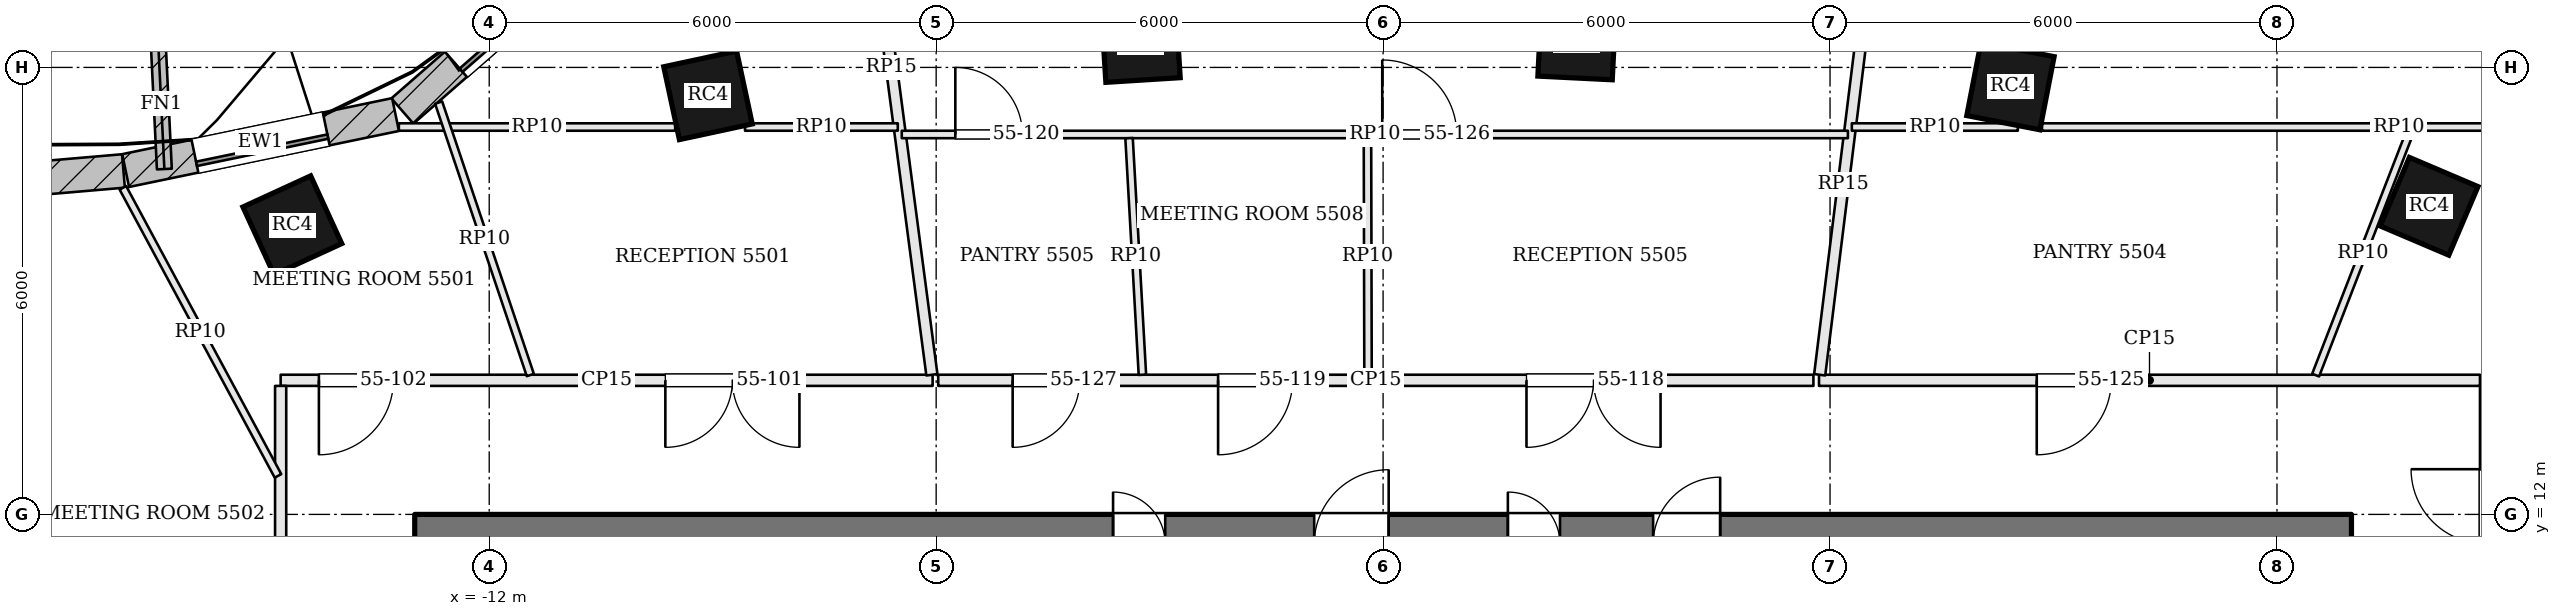
"""IFC4 building model, lengths in metres.
Left out: names, types, materials, properties, quantities, classifications, styles, units other than length and angle.
Written with IfcOpenShell. Run it as: python <this file> out.ifc"""

import sys

from ifc_helpers import new_model, si_unit, direction, frame, frame_2d, origin, origin_2d, place, context, subcontext, project, spatial, rectangle, extrude, element, fill, save


model = new_model("IFC4")
c1 = context("Model", 3, precision=1e-05, world=origin(), true_north=direction((0.0, 1.0)))
c2 = subcontext(c1, "Body", "Model", "MODEL_VIEW")
j1 = project(units=[si_unit("LENGTHUNIT", "METRE"), si_unit("PLANEANGLEUNIT", "RADIAN")], contexts=[c1])
p1 = place(None, origin())
s1 = spatial("IfcSite", under=j1, at=p1, CompositionType="ELEMENT")
p2 = place(p1, origin())
s2 = spatial("IfcBuilding", under=s1, at=p2, CompositionType="ELEMENT")
p3 = place(p2, frame((0.0, 0.0, 225.3)))
s3 = spatial("IfcBuildingStorey", under=s2, at=p3, CompositionType="ELEMENT", Elevation=225.3)
p4 = place(p3, frame((-13.0, 11.6, 0.0), z_axis=(0.0, 0.0, 1.0), x_axis=(1.0, 0.0, 0.0)))
e1 = element("IfcWall", 1, at=p4, inside=s3, PredefinedType="SHEAR", context=c2, shape_type="SweptSolid", body=[
    extrude(rectangle(XDim=26.0, YDim=0.8, at=frame_2d((13.0, 0.0))), origin(), (0.0, 0.0, 1.0), 3.9),
])
p5 = place(p4, frame((9.375, 0.0, 0.0)))
e2 = element("IfcOpeningElement", 2, at=p5, cuts=e1, PredefinedType="OPENING", context=c2, shape_type="SweptSolid", body=[
    extrude(rectangle(XDim=0.7, YDim=2.1, at=frame_2d((0.35, 1.05))), frame((0.0, 0.41, 0.0), z_axis=(0.0, -1.0, 0.0), x_axis=(1.0, 0.0, 0.0)), (0.0, 0.0, 1.0), 0.82),
])
p6 = place(p4, frame((12.075, 0.0, 0.0)))
e3 = element("IfcOpeningElement", 3, at=p6, cuts=e1, PredefinedType="OPENING", context=c2, shape_type="SweptSolid", body=[
    extrude(rectangle(XDim=1.0, YDim=2.1, at=frame_2d((0.5, 1.05))), frame((0.0, 0.41, 0.0), z_axis=(0.0, -1.0, 0.0), x_axis=(1.0, 0.0, 0.0)), (0.0, 0.0, 1.0), 0.82),
])
p7 = place(p4, frame((14.675, 0.0, 0.0)))
e4 = element("IfcOpeningElement", 4, at=p7, cuts=e1, PredefinedType="OPENING", context=c2, shape_type="SweptSolid", body=[
    extrude(rectangle(XDim=0.7, YDim=2.1, at=frame_2d((0.35, 1.05))), frame((0.0, 0.41, 0.0), z_axis=(0.0, -1.0, 0.0), x_axis=(1.0, 0.0, 0.0)), (0.0, 0.0, 1.0), 0.82),
])
p8 = place(p4, frame((16.625, 0.0, 0.0)))
e5 = element("IfcOpeningElement", 5, at=p8, cuts=e1, PredefinedType="OPENING", context=c2, shape_type="SweptSolid", body=[
    extrude(rectangle(XDim=0.9, YDim=2.1, at=frame_2d((0.45, 1.05))), frame((0.0, 0.41, 0.0), z_axis=(0.0, -1.0, 0.0), x_axis=(1.0, 0.0, 0.0)), (0.0, 0.0, 1.0), 0.82),
])
for number, where, z_axis, x_axis in (
    (6, (14.042, 16.136, 0.0), (0.0, 0.0, 1.0), (-0.92, 0.392, 0.0)),
    (7, (8.422, 17.749, 0.0), (0.0, 0.0, 1.0), (-0.982, 0.191, 0.0)),
    (8, (2.602, 18.358, 0.0), (0.0, 0.0, 1.0), (-0.999, 0.05, 0.0)),
    (9, (-3.254, 18.33, 0.0), (0.0, 0.0, 1.0), (-0.998, -0.063, 0.0)),
    (10, (-9.063, 17.625, 0.0), (0.0, 0.0, 1.0), (-0.978, -0.21, 0.0)),
    (11, (-14.643, 15.881, 0.0), (0.0, 0.0, 1.0), (-0.909, -0.417, 0.0)),
):
    element("IfcColumn", number, at=place(p3, frame(where, z_axis=z_axis, x_axis=x_axis)), inside=s3, PredefinedType="COLUMN", context=c2, shape_type="SweptSolid", body=[
        extrude(rectangle(XDim=1.0, YDim=1.0, at=origin_2d()), origin(), (0.0, 0.0, 1.0), 3.9),
    ])
p9 = place(p3, frame((-10.146, 20.051, 0.0), z_axis=(0.0, 0.0, 1.0), x_axis=(-0.753278140428, -0.657702093013, 0.0)))
e12 = element("IfcWall", 12, at=p9, inside=s3, PredefinedType="SOLIDWALL", context=c2, shape_type="SweptSolid", body=[
    extrude(rectangle(XDim=4.008, YDim=0.45, at=frame_2d((2.004, 0.0))), origin(), (0.0, 0.0, 1.0), 3.7),
])
p10 = place(p9, frame((0.954, 0.0, 0.9)))
e13 = element("IfcOpeningElement", 13, at=p10, cuts=e12, PredefinedType="OPENING", context=c2, shape_type="SweptSolid", body=[
    extrude(rectangle(XDim=2.1, YDim=2.3, at=frame_2d((1.05, 1.15))), frame((0.0, 0.235, 0.0), z_axis=(0.0, -1.0, 0.0), x_axis=(1.0, 0.0, 0.0)), (0.0, 0.0, 1.0), 0.47),
])
p11 = place(p3, frame((-13.258, 17.367, 0.0), z_axis=(0.0, 0.0, 1.0), x_axis=(-0.97914968674, -0.203140077183, 0.0)))
e14 = element("IfcWall", 14, at=p11, inside=s3, PredefinedType="SOLIDWALL", context=c2, shape_type="SweptSolid", body=[
    extrude(rectangle(XDim=3.7, YDim=0.45, at=frame_2d((1.85, 0.0))), origin(), (0.0, 0.0, 1.0), 3.7),
])
p12 = place(p11, frame((0.95, 0.0, 0.9)))
e15 = element("IfcOpeningElement", 15, at=p12, cuts=e14, PredefinedType="OPENING", context=c2, shape_type="SweptSolid", body=[
    extrude(rectangle(XDim=1.8, YDim=2.3, at=frame_2d((0.9, 1.15))), frame((0.0, 0.235, 0.0), z_axis=(0.0, -1.0, 0.0), x_axis=(1.0, 0.0, 0.0)), (0.0, 0.0, 1.0), 0.47),
])
p13 = place(p3, frame((-16.91, 16.61, 0.0), z_axis=(0.0, 0.0, 1.0), x_axis=(-0.996333165816, -0.085558299972, 0.0)))
e16 = element("IfcWall", 16, at=p13, inside=s3, PredefinedType="SOLIDWALL", context=c2, shape_type="SweptSolid", body=[
    extrude(rectangle(XDim=5.596, YDim=0.45, at=frame_2d((2.798, 0.0))), origin(), (0.0, 0.0, 1.0), 3.7),
])
p14 = place(p13, frame((1.748, 0.0, 0.9)))
e17 = element("IfcOpeningElement", 17, at=p14, cuts=e16, PredefinedType="OPENING", context=c2, shape_type="SweptSolid", body=[
    extrude(rectangle(XDim=2.1, YDim=2.3, at=frame_2d((1.05, 1.15))), frame((0.0, 0.235, 0.0), z_axis=(0.0, -1.0, 0.0), x_axis=(1.0, 0.0, 0.0)), (0.0, 0.0, 1.0), 0.47),
])
p15 = place(p3, frame((-16.361, 16.636, 0.0), z_axis=(0.0, 0.0, 1.0), x_axis=(-0.048552811097, 0.998820616795, 0.0)))
e18 = element("IfcWall", 18, at=p15, inside=s3, PredefinedType="SOLIDWALL", context=c2, shape_type="SweptSolid", body=[
    extrude(rectangle(XDim=1.75, YDim=0.2, at=frame_2d((0.875, 0.0))), origin(), (0.0, 0.0, 1.0), 3.7),
])
p16 = place(p3, frame((-6.048, 13.8, 0.0), z_axis=(0.0, 0.0, 1.0), x_axis=(-1.0, 0.0, 0.0)))
e19 = element("IfcWall", 19, at=p16, inside=s3, PredefinedType="PARTITIONING", context=c2, shape_type="SweptSolid", body=[
    extrude(rectangle(XDim=8.752, YDim=0.15, at=frame_2d((4.376, 0.0))), origin(), (0.0, 0.0, 1.0), 3.084),
])
p17 = place(p16, frame((1.788, 0.0, 0.0)))
e20 = element("IfcOpeningElement", 20, at=p17, cuts=e19, PredefinedType="OPENING", context=c2, shape_type="SweptSolid", body=[
    extrude(rectangle(XDim=1.8, YDim=2.1, at=frame_2d((0.9, 1.05))), frame((0.0, 0.085, 0.0), z_axis=(0.0, -1.0, 0.0), x_axis=(1.0, 0.0, 0.0)), (0.0, 0.0, 1.0), 0.17),
])
p18 = place(p16, frame((7.239, 0.0, 0.0)))
e21 = element("IfcOpeningElement", 21, at=p18, cuts=e19, PredefinedType="OPENING", context=c2, shape_type="SweptSolid", body=[
    extrude(rectangle(XDim=1.0, YDim=2.4, at=frame_2d((0.5, 1.2))), frame((0.0, 0.085, 0.0), z_axis=(0.0, -1.0, 0.0), x_axis=(1.0, 0.0, 0.0)), (0.0, 0.0, 1.0), 0.17),
])
p19 = place(p3, frame((-14.8, 13.725, 0.0), z_axis=(0.0, 0.0, 1.0), x_axis=(0.0, -1.0, 0.0)))
e22 = element("IfcWall", 22, at=p19, inside=s3, PredefinedType="PARTITIONING", context=c2, shape_type="SweptSolid", body=[
    extrude(rectangle(XDim=15.965, YDim=0.15, at=frame_2d((7.982, 0.0))), origin(), (0.0, 0.0, 1.0), 3.084),
])
p20 = place(p19, frame((3.271, 0.0, 0.0)))
e23 = element("IfcOpeningElement", 23, at=p20, cuts=e22, PredefinedType="OPENING", context=c2, shape_type="SweptSolid", body=[
    extrude(rectangle(XDim=1.0, YDim=2.4, at=frame_2d((0.5, 1.2))), frame((0.0, 0.085, 0.0), z_axis=(0.0, -1.0, 0.0), x_axis=(1.0, 0.0, 0.0)), (0.0, 0.0, 1.0), 0.17),
])
p21 = place(p19, frame((8.35, 0.0, 0.0)))
e24 = element("IfcOpeningElement", 24, at=p21, cuts=e22, PredefinedType="OPENING", context=c2, shape_type="SweptSolid", body=[
    extrude(rectangle(XDim=1.0, YDim=2.1, at=frame_2d((0.5, 1.05))), frame((0.0, 0.085, 0.0), z_axis=(0.0, -1.0, 0.0), x_axis=(1.0, 0.0, 0.0)), (0.0, 0.0, 1.0), 0.17),
])
p22 = place(p19, frame((13.15, 0.0, 0.0)))
e25 = element("IfcOpeningElement", 25, at=p22, cuts=e22, PredefinedType="OPENING", context=c2, shape_type="SweptSolid", body=[
    extrude(rectangle(XDim=1.0, YDim=2.1, at=frame_2d((0.5, 1.05))), frame((0.0, 0.085, 0.0), z_axis=(0.0, -1.0, 0.0), x_axis=(1.0, 0.0, 0.0)), (0.0, 0.0, 1.0), 0.17),
])
p23 = place(p3, frame((-7.144, 22.13, 0.0), z_axis=(0.0, 0.0, 1.0), x_axis=(0.130452237095, -0.991454594945, 0.0)))
e26 = element("IfcWall", 26, at=p23, inside=s3, PredefinedType="PARTITIONING", context=c2, shape_type="SweptSolid", body=[
    extrude(rectangle(XDim=8.326, YDim=0.15, at=frame_2d((4.163, 0.0))), origin(), (0.0, 0.0, 1.0), 3.184),
])
p24 = place(p3, frame((14.8, -2.171, 0.0), z_axis=(0.0, 0.0, 1.0), x_axis=(0.0, 1.0, 0.0)))
e27 = element("IfcWall", 27, at=p24, inside=s3, PredefinedType="PARTITIONING", context=c2, shape_type="SweptSolid", body=[
    extrude(rectangle(XDim=15.971, YDim=0.15, at=frame_2d((7.986, 0.0))), origin(), (0.0, 0.0, 1.0), 3.084),
])
p25 = place(p24, frame((4.2, 0.0, 0.0)))
e28 = element("IfcOpeningElement", 28, at=p25, cuts=e27, PredefinedType="OPENING", context=c2, shape_type="SweptSolid", body=[
    extrude(rectangle(XDim=1.8, YDim=2.1, at=frame_2d((0.9, 1.05))), frame((0.0, 0.085, 0.0), z_axis=(0.0, -1.0, 0.0), x_axis=(1.0, 0.0, 0.0)), (0.0, 0.0, 1.0), 0.17),
])
p26 = place(p24, frame((13.778, 0.0, 0.0)))
e29 = element("IfcOpeningElement", 29, at=p26, cuts=e27, PredefinedType="OPENING", context=c2, shape_type="SweptSolid", body=[
    extrude(rectangle(XDim=1.0, YDim=2.4, at=frame_2d((0.5, 1.2))), frame((0.0, 0.085, 0.0), z_axis=(0.0, -1.0, 0.0), x_axis=(1.0, 0.0, 0.0)), (0.0, 0.0, 1.0), 0.17),
])
p27 = place(p3, frame((14.725, 13.8, 0.0), z_axis=(0.0, 0.0, 1.0), x_axis=(-1.0, 0.0, 0.0)))
e30 = element("IfcWall", 30, at=p27, inside=s3, PredefinedType="PARTITIONING", context=c2, shape_type="SweptSolid", body=[
    extrude(rectangle(XDim=8.873, YDim=0.15, at=frame_2d((4.437, 0.0))), origin(), (0.0, 0.0, 1.0), 3.084),
])
p28 = place(p27, frame((4.95, 0.0, 0.0)))
e31 = element("IfcOpeningElement", 31, at=p28, cuts=e30, PredefinedType="OPENING", context=c2, shape_type="SweptSolid", body=[
    extrude(rectangle(XDim=1.0, YDim=2.1, at=frame_2d((0.5, 1.05))), frame((0.0, 0.085, 0.0), z_axis=(0.0, -1.0, 0.0), x_axis=(1.0, 0.0, 0.0)), (0.0, 0.0, 1.0), 0.17),
])
p29 = place(p3, frame((6.493, 18.982, 0.0), z_axis=(0.0, 0.0, 1.0), x_axis=(-0.122808633413, -0.992430370131, 0.0)))
e32 = element("IfcWall", 32, at=p29, inside=s3, PredefinedType="PARTITIONING", context=c2, shape_type="SweptSolid", body=[
    extrude(rectangle(XDim=5.147, YDim=0.15, at=frame_2d((2.573, 0.0))), origin(), (0.0, 0.0, 1.0), 3.184),
])
p30 = place(p3, frame((5.777, 13.8, 0.0), z_axis=(0.0, 0.0, 1.0), x_axis=(-1.0, 0.0, 0.0)))
e33 = element("IfcWall", 33, at=p30, inside=s3, PredefinedType="PARTITIONING", context=c2, shape_type="SweptSolid", body=[
    extrude(rectangle(XDim=11.749, YDim=0.15, at=frame_2d((5.875, 0.0))), origin(), (0.0, 0.0, 1.0), 3.084),
])
p31 = place(p30, frame((2.052, 0.0, 0.0)))
e34 = element("IfcOpeningElement", 34, at=p31, cuts=e33, PredefinedType="OPENING", context=c2, shape_type="SweptSolid", body=[
    extrude(rectangle(XDim=1.8, YDim=2.1, at=frame_2d((0.9, 1.05))), frame((0.0, 0.085, 0.0), z_axis=(0.0, -1.0, 0.0), x_axis=(1.0, 0.0, 0.0)), (0.0, 0.0, 1.0), 0.17),
])
p32 = place(p30, frame((6.992, 0.0, 0.0)))
e35 = element("IfcOpeningElement", 35, at=p32, cuts=e33, PredefinedType="OPENING", context=c2, shape_type="SweptSolid", body=[
    extrude(rectangle(XDim=1.0, YDim=2.4, at=frame_2d((0.5, 1.2))), frame((0.0, 0.085, 0.0), z_axis=(0.0, -1.0, 0.0), x_axis=(1.0, 0.0, 0.0)), (0.0, 0.0, 1.0), 0.17),
])
p33 = place(p30, frame((9.85, 0.0, 0.0)))
e36 = element("IfcOpeningElement", 36, at=p33, cuts=e33, PredefinedType="OPENING", context=c2, shape_type="SweptSolid", body=[
    extrude(rectangle(XDim=0.9, YDim=2.1, at=frame_2d((0.45, 1.05))), frame((0.0, 0.085, 0.0), z_axis=(0.0, -1.0, 0.0), x_axis=(1.0, 0.0, 0.0)), (0.0, 0.0, 1.0), 0.17),
])
p34 = place(p3, frame((-13.213, 17.2, 0.0), z_axis=(0.0, 0.0, 1.0), x_axis=(1.0, 0.0, 0.0)))
e37 = element("IfcWall", 37, at=p34, inside=s3, PredefinedType="PARTITIONING", context=c2, shape_type="SweptSolid", body=[
    extrude(rectangle(XDim=3.71, YDim=0.1, at=frame_2d((1.855, 0.0))), origin(), (0.0, 0.0, 1.0), 3.084),
])
p35 = place(p3, frame((-8.566, 17.2, 0.0), z_axis=(0.0, 0.0, 1.0), x_axis=(1.0, 0.0, 0.0)))
e38 = element("IfcWall", 38, at=p35, inside=s3, PredefinedType="PARTITIONING", context=c2, shape_type="SweptSolid", body=[
    extrude(rectangle(XDim=2.051, YDim=0.1, at=frame_2d((1.025, 0.0))), origin(), (0.0, 0.0, 1.0), 3.084),
])
p36 = place(p3, frame((-11.448, 13.871, 0.0), z_axis=(0.0, 0.0, 1.0), x_axis=(-0.319016686957, 0.94774909836, 0.0)))
e39 = element("IfcWall", 39, at=p36, inside=s3, PredefinedType="PARTITIONING", context=c2, shape_type="SweptSolid", body=[
    extrude(rectangle(XDim=3.859, YDim=0.1, at=frame_2d((1.929, 0.0))), origin(), (0.0, 0.0, 1.0), 3.084),
])
p37 = place(p3, frame((-14.836, 12.517, 0.0), z_axis=(0.0, 0.0, 1.0), x_axis=(-0.474069987859, 0.880487164365, 0.0)))
e40 = element("IfcWall", 40, at=p37, inside=s3, PredefinedType="PARTITIONING", context=c2, shape_type="SweptSolid", body=[
    extrude(rectangle(XDim=4.392, YDim=0.1, at=frame_2d((2.196, 0.0))), origin(), (0.0, 0.0, 1.0), 3.084),
])
p38 = place(p3, frame((6.293, 17.2, 0.0), z_axis=(0.0, 0.0, 1.0), x_axis=(1.0, 0.0, 0.0)))
e41 = element("IfcWall", 41, at=p38, inside=s3, PredefinedType="PARTITIONING", context=c2, shape_type="SweptSolid", body=[
    extrude(rectangle(XDim=2.229, YDim=0.1, at=frame_2d((1.114, 0.0))), origin(), (0.0, 0.0, 1.0), 3.084),
])
p39 = place(p3, frame((8.845, 17.2, 0.0), z_axis=(0.0, 0.0, 1.0), x_axis=(1.0, 0.0, 0.0)))
e42 = element("IfcWall", 42, at=p39, inside=s3, PredefinedType="PARTITIONING", context=c2, shape_type="SweptSolid", body=[
    extrude(rectangle(XDim=9.583, YDim=0.1, at=frame_2d((4.791, 0.0))), origin(), (0.0, 0.0, 1.0), 3.084),
])
p40 = place(p3, frame((12.519, 13.87, 0.0), z_axis=(0.0, 0.0, 1.0), x_axis=(0.361713546528, 0.932289284642, 0.0)))
e43 = element("IfcWall", 43, at=p40, inside=s3, PredefinedType="PARTITIONING", context=c2, shape_type="SweptSolid", body=[
    extrude(rectangle(XDim=3.522, YDim=0.1, at=frame_2d((1.761, 0.0))), origin(), (0.0, 0.0, 1.0), 3.084),
])
p41 = place(p3, frame((-6.462, 17.1, 0.0), z_axis=(0.0, 0.0, 1.0), x_axis=(1.0, 0.0, 0.0)))
e44 = element("IfcWall", 44, at=p41, inside=s3, PredefinedType="PARTITIONING", context=c2, shape_type="SweptSolid", body=[
    extrude(rectangle(XDim=12.702, YDim=0.1, at=frame_2d((6.351, 0.0))), origin(), (0.0, 0.0, 1.0), 3.084),
])
p42 = place(p41, frame((0.719, 0.0, 0.0)))
e45 = element("IfcOpeningElement", 45, at=p42, cuts=e44, PredefinedType="OPENING", context=c2, shape_type="SweptSolid", body=[
    extrude(rectangle(XDim=0.9, YDim=2.1, at=frame_2d((0.45, 1.05))), frame((0.0, 0.06, 0.0), z_axis=(0.0, -1.0, 0.0), x_axis=(1.0, 0.0, 0.0)), (0.0, 0.0, 1.0), 0.12),
])
p43 = place(p41, frame((6.45, 0.0, 0.0)))
e46 = element("IfcOpeningElement", 46, at=p43, cuts=e44, PredefinedType="OPENING", context=c2, shape_type="SweptSolid", body=[
    extrude(rectangle(XDim=1.0, YDim=2.1, at=frame_2d((0.5, 1.05))), frame((0.0, 0.06, 0.0), z_axis=(0.0, -1.0, 0.0), x_axis=(1.0, 0.0, 0.0)), (0.0, 0.0, 1.0), 0.12),
])
p44 = place(p3, frame((-0.202, 13.875, 0.0), z_axis=(0.0, 0.0, 1.0), x_axis=(-0.002306798937, 0.999997339336, 0.0)))
e47 = element("IfcWall", 47, at=p44, inside=s3, PredefinedType="PARTITIONING", context=c2, shape_type="SweptSolid", body=[
    extrude(rectangle(XDim=3.175, YDim=0.1, at=frame_2d((1.587, 0.0))), origin(), (0.0, 0.0, 1.0), 3.084),
])
p45 = place(p3, frame((-3.231, 13.875, 0.0), z_axis=(0.0, 0.0, 1.0), x_axis=(-0.056350151772, 0.998411067845, 0.0)))
e48 = element("IfcWall", 48, at=p45, inside=s3, PredefinedType="PARTITIONING", context=c2, shape_type="SweptSolid", body=[
    extrude(rectangle(XDim=3.18, YDim=0.1, at=frame_2d((1.59, 0.0))), origin(), (0.0, 0.0, 1.0), 3.084),
])
p46 = place(p10, origin())
e49 = element("IfcWindow", 49, at=p46, inside=s3, PartitioningType="SINGLE_PANEL", PredefinedType="WINDOW", context=c2, shape_type="SweptSolid", body=[
    extrude(rectangle(XDim=2.1, YDim=2.3, at=frame_2d((1.05, 1.15))), frame((0.0, 0.135, 0.0), z_axis=(0.0, -1.0, 0.0), x_axis=(1.0, 0.0, 0.0)), (0.0, 0.0, 1.0), 0.06),
])
fill(e13, e49)
p47 = place(p12, origin())
e50 = element("IfcWindow", 50, at=p47, inside=s3, PartitioningType="SINGLE_PANEL", PredefinedType="WINDOW", context=c2, shape_type="SweptSolid", body=[
    extrude(rectangle(XDim=1.8, YDim=2.3, at=frame_2d((0.9, 1.15))), frame((0.0, 0.135, 0.0), z_axis=(0.0, -1.0, 0.0), x_axis=(1.0, 0.0, 0.0)), (0.0, 0.0, 1.0), 0.06),
])
fill(e15, e50)
p48 = place(p17, origin())
e51 = element("IfcDoor", 51, at=p48, inside=s3, OperationType="DOUBLE_DOOR_SINGLE_SWING", PredefinedType="DOOR", context=c2, shape_type="SweptSolid", body=[
    extrude(rectangle(XDim=1.8, YDim=2.1, at=frame_2d((0.9, 1.05))), frame((0.0, 0.025, 0.0), z_axis=(0.0, -1.0, 0.0), x_axis=(1.0, 0.0, 0.0)), (0.0, 0.0, 1.0), 0.05),
])
fill(e20, e51)
p49 = place(p18, origin())
e52 = element("IfcDoor", 52, at=p49, inside=s3, OperationType="SINGLE_SWING_RIGHT", PredefinedType="DOOR", context=c2, shape_type="SweptSolid", body=[
    extrude(rectangle(XDim=1.0, YDim=2.4, at=frame_2d((0.5, 1.2))), frame((0.0, 0.025, 0.0), z_axis=(0.0, -1.0, 0.0), x_axis=(1.0, 0.0, 0.0)), (0.0, 0.0, 1.0), 0.05),
])
fill(e21, e52)
p50 = place(p31, origin())
e53 = element("IfcDoor", 53, at=p50, inside=s3, OperationType="DOUBLE_DOOR_SINGLE_SWING", PredefinedType="DOOR", context=c2, shape_type="SweptSolid", body=[
    extrude(rectangle(XDim=1.8, YDim=2.1, at=frame_2d((0.9, 1.05))), frame((0.0, 0.025, 0.0), z_axis=(0.0, -1.0, 0.0), x_axis=(1.0, 0.0, 0.0)), (0.0, 0.0, 1.0), 0.05),
])
fill(e34, e53)
p51 = place(p32, origin())
e54 = element("IfcDoor", 54, at=p51, inside=s3, OperationType="SINGLE_SWING_RIGHT", PredefinedType="DOOR", context=c2, shape_type="SweptSolid", body=[
    extrude(rectangle(XDim=1.0, YDim=2.4, at=frame_2d((0.5, 1.2))), frame((0.0, 0.025, 0.0), z_axis=(0.0, -1.0, 0.0), x_axis=(1.0, 0.0, 0.0)), (0.0, 0.0, 1.0), 0.05),
])
fill(e35, e54)
p52 = place(p42, origin())
e55 = element("IfcDoor", 55, at=p52, inside=s3, OperationType="SINGLE_SWING_LEFT", PredefinedType="DOOR", context=c2, shape_type="SweptSolid", body=[
    extrude(rectangle(XDim=0.9, YDim=2.1, at=frame_2d((0.45, 1.05))), frame((0.0, 0.025, 0.0), z_axis=(0.0, -1.0, 0.0), x_axis=(1.0, 0.0, 0.0)), (0.0, 0.0, 1.0), 0.05),
])
fill(e45, e55)
p53 = place(p28, origin())
e56 = element("IfcDoor", 56, at=p53, inside=s3, OperationType="SINGLE_SWING_RIGHT", PredefinedType="DOOR", context=c2, shape_type="SweptSolid", body=[
    extrude(rectangle(XDim=1.0, YDim=2.1, at=frame_2d((0.5, 1.05))), frame((0.0, 0.025, 0.0), z_axis=(0.0, -1.0, 0.0), x_axis=(1.0, 0.0, 0.0)), (0.0, 0.0, 1.0), 0.05),
])
fill(e31, e56)
p54 = place(p43, origin())
e57 = element("IfcDoor", 57, at=p54, inside=s3, OperationType="SINGLE_SWING_LEFT", PredefinedType="DOOR", context=c2, shape_type="SweptSolid", body=[
    extrude(rectangle(XDim=1.0, YDim=2.1, at=frame_2d((0.5, 1.05))), frame((0.0, 0.025, 0.0), z_axis=(0.0, -1.0, 0.0), x_axis=(1.0, 0.0, 0.0)), (0.0, 0.0, 1.0), 0.05),
])
fill(e46, e57)
p55 = place(p33, origin())
e58 = element("IfcDoor", 58, at=p55, inside=s3, OperationType="SINGLE_SWING_RIGHT", PredefinedType="DOOR", context=c2, shape_type="SweptSolid", body=[
    extrude(rectangle(XDim=0.9, YDim=2.1, at=frame_2d((0.45, 1.05))), frame((0.0, 0.025, 0.0), z_axis=(0.0, -1.0, 0.0), x_axis=(1.0, 0.0, 0.0)), (0.0, 0.0, 1.0), 0.05),
])
fill(e36, e58)
save(model, sys.argv[1])
